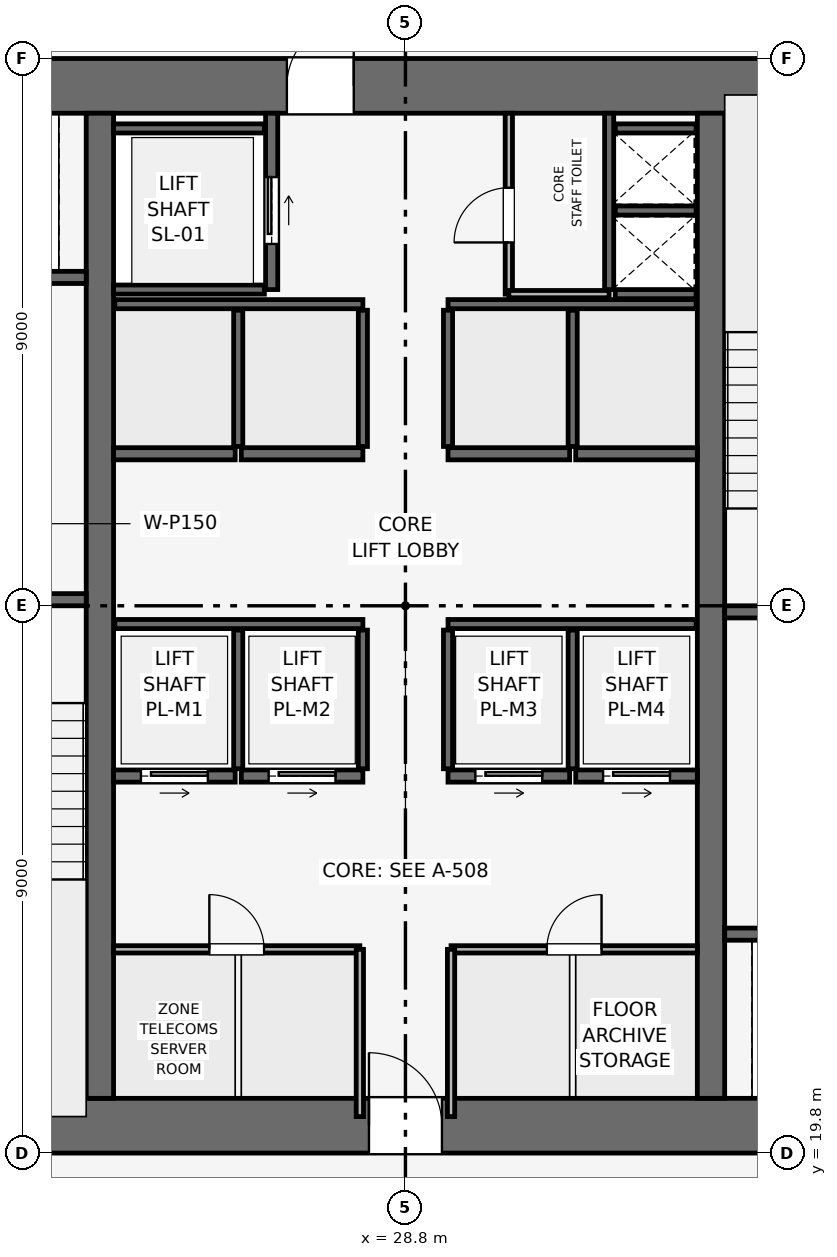
"""IFC4 building model, lengths in metres.
Left out: names, types, materials, properties, quantities, classifications, styles, units other than length and angle.
Written with IfcOpenShell. Run it as: python <this file> out.ifc"""

import sys

from ifc_helpers import new_model, si_unit, direction, frame, frame_2d, origin, place, context, subcontext, project, spatial, rectangle, extrude, element, fill, save


model = new_model("IFC4")
c1 = context("Model", 3, precision=1e-05, world=origin(), true_north=direction((0.0, 1.0)))
c2 = subcontext(c1, "Body", "Model", "MODEL_VIEW")
j1 = project(units=[si_unit("LENGTHUNIT", "METRE"), si_unit("PLANEANGLEUNIT", "RADIAN")], contexts=[c1])
p1 = place(None, origin())
s1 = spatial("IfcSite", under=j1, at=p1, CompositionType="ELEMENT")
p2 = place(p1, origin())
s2 = spatial("IfcBuilding", under=s1, at=p2, CompositionType="ELEMENT")
p3 = place(p2, frame((0.0, 0.0, 172.05)))
s3 = spatial("IfcBuildingStorey", under=s2, at=p3, CompositionType="ELEMENT", Elevation=172.05)
p4 = place(p3, frame((19.8, 20.25, 0.0), z_axis=(0.0, 0.0, 1.0), x_axis=(1.0, 0.0, 0.0)))
e1 = element("IfcWall", 1, at=p4, inside=s3, PredefinedType="SHEAR", context=c2, shape_type="SweptSolid", body=[
    extrude(rectangle(XDim=18.0, YDim=0.9, at=frame_2d((9.0, 0.0))), origin(), (0.0, 0.0, 1.0), 3.75),
])
p5 = place(p4, frame((8.4, 0.0, 0.0)))
e2 = element("IfcOpeningElement", 2, at=p5, cuts=e1, PredefinedType="OPENING", context=c2, shape_type="SweptSolid", body=[
    extrude(rectangle(XDim=1.2, YDim=2.2, at=frame_2d((0.6, 1.1))), frame((0.0, 0.46, 0.0), z_axis=(0.0, -1.0, 0.0), x_axis=(1.0, 0.0, 0.0)), (0.0, 0.0, 1.0), 0.92),
])
p6 = place(p3, frame((19.8, 37.35, 0.0), z_axis=(0.0, 0.0, 1.0), x_axis=(1.0, 0.0, 0.0)))
e3 = element("IfcWall", 3, at=p6, inside=s3, PredefinedType="SHEAR", context=c2, shape_type="SweptSolid", body=[
    extrude(rectangle(XDim=18.0, YDim=0.9, at=frame_2d((9.0, 0.0))), origin(), (0.0, 0.0, 1.0), 3.75),
])
p7 = place(p6, frame((7.05, 0.0, 0.0)))
e4 = element("IfcOpeningElement", 4, at=p7, cuts=e3, PredefinedType="OPENING", context=c2, shape_type="SweptSolid", body=[
    extrude(rectangle(XDim=1.1, YDim=2.15, at=frame_2d((0.55, 1.075))), frame((0.0, 0.46, 0.0), z_axis=(0.0, -1.0, 0.0), x_axis=(1.0, 0.0, 0.0)), (0.0, 0.0, 1.0), 0.92),
])
for number, where, z_axis, x_axis in (
    (5, (23.775, 20.7, 0.0), (0.0, 0.0, 1.0), (0.0, 1.0, 0.0)),
    (6, (33.825, 20.7, 0.0), (0.0, 0.0, 1.0), (0.0, 1.0, 0.0)),
):
    element("IfcWall", number, at=place(p3, frame(where, z_axis=z_axis, x_axis=x_axis)), inside=s3, PredefinedType="SHEAR", context=c2, shape_type="SweptSolid", body=[
        extrude(rectangle(XDim=16.2, YDim=0.45, at=frame_2d((8.1, 0.0))), origin(), (0.0, 0.0, 1.0), 3.75),
    ])
p8 = place(p3, frame((20.4, 28.9, 0.0), z_axis=(0.0, 0.0, 1.0), x_axis=(1.0, 0.0, 0.0)))
e7 = element("IfcWall", 7, at=p8, inside=s3, PredefinedType="SHEAR", context=c2, shape_type="SweptSolid", body=[
    extrude(rectangle(XDim=3.15, YDim=0.2, at=frame_2d((1.575, 0.0))), origin(), (0.0, 0.0, 1.0), 3.495),
])
p9 = place(p8, frame((0.8, 0.0, 0.0)))
e8 = element("IfcOpeningElement", 8, at=p9, cuts=e7, PredefinedType="OPENING", context=c2, shape_type="SweptSolid", body=[
    extrude(rectangle(XDim=1.0, YDim=2.1, at=frame_2d((0.5, 1.05))), frame((0.0, 0.11, 0.0), z_axis=(0.0, -1.0, 0.0), x_axis=(1.0, 0.0, 0.0)), (0.0, 0.0, 1.0), 0.22),
])
p10 = place(p3, frame((34.05, 28.7, 0.0), z_axis=(0.0, 0.0, 1.0), x_axis=(1.0, 0.0, 0.0)))
e9 = element("IfcWall", 9, at=p10, inside=s3, PredefinedType="SHEAR", context=c2, shape_type="SweptSolid", body=[
    extrude(rectangle(XDim=3.15, YDim=0.2, at=frame_2d((1.575, 0.0))), origin(), (0.0, 0.0, 1.0), 3.495),
])
p11 = place(p10, frame((0.8, 0.0, 0.0)))
e10 = element("IfcOpeningElement", 10, at=p11, cuts=e9, PredefinedType="OPENING", context=c2, shape_type="SweptSolid", body=[
    extrude(rectangle(XDim=1.0, YDim=2.1, at=frame_2d((0.5, 1.05))), frame((0.0, 0.11, 0.0), z_axis=(0.0, -1.0, 0.0), x_axis=(1.0, 0.0, 0.0)), (0.0, 0.0, 1.0), 0.22),
])
p12 = place(p3, frame((32.15, 34.0, 0.0), z_axis=(0.0, 0.0, 1.0), x_axis=(0.0, 1.0, 0.0)))
e11 = element("IfcWall", 11, at=p12, inside=s3, PredefinedType="SHEAR", context=c2, shape_type="SweptSolid", body=[
    extrude(rectangle(XDim=2.9, YDim=0.15, at=frame_2d((1.45, 0.0))), origin(), (0.0, 0.0, 1.0), 3.495),
])
for number, where, z_axis, x_axis in (
    (12, (32.25, 33.925, 0.0), (0.0, 0.0, 1.0), (1.0, 0.0, 0.0)),
    (13, (32.25, 35.3, 0.0), (0.0, 0.0, 1.0), (1.0, 0.0, 0.0)),
):
    element("IfcWall", number, at=place(p3, frame(where, z_axis=z_axis, x_axis=x_axis)), inside=s3, PredefinedType="SHEAR", context=c2, shape_type="SweptSolid", body=[
        extrude(rectangle(XDim=1.33, YDim=0.15, at=frame_2d((0.665, 0.0))), origin(), (0.0, 0.0, 1.0), 3.495),
    ])
p13 = place(p3, frame((20.5, 34.2, 0.0), z_axis=(0.0, 0.0, 1.0), x_axis=(1.0, 0.0, 0.0)))
e14 = element("IfcWall", 14, at=p13, inside=s3, PredefinedType="SHEAR", context=c2, shape_type="SweptSolid", body=[
    extrude(rectangle(XDim=3.05, YDim=0.2, at=frame_2d((1.525, 0.0))), origin(), (0.0, 0.0, 1.0), 3.495),
])
p14 = place(p13, frame((0.75, 0.0, 0.0)))
e15 = element("IfcOpeningElement", 15, at=p14, cuts=e14, PredefinedType="OPENING", context=c2, shape_type="SweptSolid", body=[
    extrude(rectangle(XDim=1.1, YDim=2.15, at=frame_2d((0.55, 1.075))), frame((0.0, 0.11, 0.0), z_axis=(0.0, -1.0, 0.0), x_axis=(1.0, 0.0, 0.0)), (0.0, 0.0, 1.0), 0.22),
])
p15 = place(p3, frame((34.05, 23.4, 0.0), z_axis=(0.0, 0.0, 1.0), x_axis=(1.0, 0.0, 0.0)))
e16 = element("IfcWall", 16, at=p15, inside=s3, PredefinedType="SHEAR", context=c2, shape_type="SweptSolid", body=[
    extrude(rectangle(XDim=3.05, YDim=0.2, at=frame_2d((1.525, 0.0))), origin(), (0.0, 0.0, 1.0), 3.495),
])
p16 = place(p15, frame((1.2, 0.0, 0.0)))
e17 = element("IfcOpeningElement", 17, at=p16, cuts=e16, PredefinedType="OPENING", context=c2, shape_type="SweptSolid", body=[
    extrude(rectangle(XDim=1.1, YDim=2.15, at=frame_2d((0.55, 1.075))), frame((0.0, 0.11, 0.0), z_axis=(0.0, -1.0, 0.0), x_axis=(1.0, 0.0, 0.0)), (0.0, 0.0, 1.0), 0.22),
])
p17 = place(p3, frame((26.6, 34.0, 0.0), z_axis=(0.0, 0.0, 1.0), x_axis=(0.0, 1.0, 0.0)))
e18 = element("IfcWall", 18, at=p17, inside=s3, PredefinedType="SHEAR", context=c2, shape_type="SweptSolid", body=[
    extrude(rectangle(XDim=2.9, YDim=0.2, at=frame_2d((1.45, 0.0))), origin(), (0.0, 0.0, 1.0), 3.495),
])
p18 = place(p17, frame((0.75, 0.0, 0.0)))
e19 = element("IfcOpeningElement", 19, at=p18, cuts=e18, PredefinedType="OPENING", context=c2, shape_type="SweptSolid", body=[
    extrude(rectangle(XDim=1.1, YDim=2.15, at=frame_2d((0.55, 1.075))), frame((0.0, 0.11, 0.0), z_axis=(0.0, -1.0, 0.0), x_axis=(1.0, 0.0, 0.0)), (0.0, 0.0, 1.0), 0.22),
])
for number, where, z_axis, x_axis in (
    (20, (24.0, 34.0, 0.0), (0.0, 0.0, 1.0), (1.0, 0.0, 0.0)),
    (21, (24.0, 36.65, 0.0), (0.0, 0.0, 1.0), (1.0, 0.0, 0.0)),
):
    element("IfcWall", number, at=place(p3, frame(where, z_axis=z_axis, x_axis=x_axis)), inside=s3, PredefinedType="SHEAR", context=c2, shape_type="SweptSolid", body=[
        extrude(rectangle(XDim=2.48, YDim=0.15, at=frame_2d((1.24, 0.0))), origin(), (0.0, 0.0, 1.0), 3.495),
    ])
p19 = place(p3, frame((24.0, 26.0, 0.0), z_axis=(0.0, 0.0, 1.0), x_axis=(1.0, 0.0, 0.0)))
e22 = element("IfcWall", 22, at=p19, inside=s3, PredefinedType="SHEAR", context=c2, shape_type="SweptSolid", body=[
    extrude(rectangle(XDim=2.0, YDim=0.2, at=frame_2d((1.0, 0.0))), origin(), (0.0, 0.0, 1.0), 3.495),
])
p20 = place(p19, frame((0.45, 0.0, 0.0)))
e23 = element("IfcOpeningElement", 23, at=p20, cuts=e22, PredefinedType="OPENING", context=c2, shape_type="SweptSolid", body=[
    extrude(rectangle(XDim=1.1, YDim=2.15, at=frame_2d((0.55, 1.075))), frame((0.0, 0.11, 0.0), z_axis=(0.0, -1.0, 0.0), x_axis=(1.0, 0.0, 0.0)), (0.0, 0.0, 1.0), 0.22),
])
p21 = place(p3, frame((26.1, 26.0, 0.0), z_axis=(0.0, 0.0, 1.0), x_axis=(1.0, 0.0, 0.0)))
e24 = element("IfcWall", 24, at=p21, inside=s3, PredefinedType="SHEAR", context=c2, shape_type="SweptSolid", body=[
    extrude(rectangle(XDim=2.0, YDim=0.2, at=frame_2d((1.0, 0.0))), origin(), (0.0, 0.0, 1.0), 3.495),
])
p22 = place(p21, frame((0.45, 0.0, 0.0)))
e25 = element("IfcOpeningElement", 25, at=p22, cuts=e24, PredefinedType="OPENING", context=c2, shape_type="SweptSolid", body=[
    extrude(rectangle(XDim=1.1, YDim=2.15, at=frame_2d((0.55, 1.075))), frame((0.0, 0.11, 0.0), z_axis=(0.0, -1.0, 0.0), x_axis=(1.0, 0.0, 0.0)), (0.0, 0.0, 1.0), 0.22),
])
p23 = place(p3, frame((29.5, 26.0, 0.0), z_axis=(0.0, 0.0, 1.0), x_axis=(1.0, 0.0, 0.0)))
e26 = element("IfcWall", 26, at=p23, inside=s3, PredefinedType="SHEAR", context=c2, shape_type="SweptSolid", body=[
    extrude(rectangle(XDim=2.0, YDim=0.2, at=frame_2d((1.0, 0.0))), origin(), (0.0, 0.0, 1.0), 3.495),
])
p24 = place(p23, frame((0.45, 0.0, 0.0)))
e27 = element("IfcOpeningElement", 27, at=p24, cuts=e26, PredefinedType="OPENING", context=c2, shape_type="SweptSolid", body=[
    extrude(rectangle(XDim=1.1, YDim=2.15, at=frame_2d((0.55, 1.075))), frame((0.0, 0.11, 0.0), z_axis=(0.0, -1.0, 0.0), x_axis=(1.0, 0.0, 0.0)), (0.0, 0.0, 1.0), 0.22),
])
p25 = place(p3, frame((31.6, 26.0, 0.0), z_axis=(0.0, 0.0, 1.0), x_axis=(1.0, 0.0, 0.0)))
e28 = element("IfcWall", 28, at=p25, inside=s3, PredefinedType="SHEAR", context=c2, shape_type="SweptSolid", body=[
    extrude(rectangle(XDim=2.0, YDim=0.2, at=frame_2d((1.0, 0.0))), origin(), (0.0, 0.0, 1.0), 3.495),
])
p26 = place(p25, frame((0.45, 0.0, 0.0)))
e29 = element("IfcOpeningElement", 29, at=p26, cuts=e28, PredefinedType="OPENING", context=c2, shape_type="SweptSolid", body=[
    extrude(rectangle(XDim=1.1, YDim=2.15, at=frame_2d((0.55, 1.075))), frame((0.0, 0.11, 0.0), z_axis=(0.0, -1.0, 0.0), x_axis=(1.0, 0.0, 0.0)), (0.0, 0.0, 1.0), 0.22),
])
for number, where, z_axis, x_axis in (
    (30, (24.0, 31.3, 0.0), (0.0, 0.0, 1.0), (1.0, 0.0, 0.0)),
    (31, (26.1, 31.3, 0.0), (0.0, 0.0, 1.0), (1.0, 0.0, 0.0)),
    (32, (29.5, 31.3, 0.0), (0.0, 0.0, 1.0), (1.0, 0.0, 0.0)),
    (33, (31.6, 31.3, 0.0), (0.0, 0.0, 1.0), (1.0, 0.0, 0.0)),
):
    element("IfcWall", number, at=place(p3, frame(where, z_axis=z_axis, x_axis=x_axis)), inside=s3, PredefinedType="SHEAR", context=c2, shape_type="SweptSolid", body=[
        extrude(rectangle(XDim=2.0, YDim=0.2, at=frame_2d((1.0, 0.0))), origin(), (0.0, 0.0, 1.0), 3.495),
    ])
p27 = place(p3, frame((32.25, 36.65, 0.0), z_axis=(0.0, 0.0, 1.0), x_axis=(1.0, 0.0, 0.0)))
e34 = element("IfcWall", 34, at=p27, inside=s3, PredefinedType="SHEAR", context=c2, shape_type="SweptSolid", body=[
    extrude(rectangle(XDim=1.33, YDim=0.15, at=frame_2d((0.665, 0.0))), origin(), (0.0, 0.0, 1.0), 3.495),
])
for number, where, z_axis, x_axis in (
    (35, (24.02, 28.5, 0.0), (0.0, 0.0, 1.0), (1.0, 0.0, 0.0)),
    (36, (29.5, 28.5, 0.0), (0.0, 0.0, 1.0), (1.0, 0.0, 0.0)),
):
    element("IfcWall", number, at=place(p3, frame(where, z_axis=z_axis, x_axis=x_axis)), inside=s3, PredefinedType="SHEAR", context=c2, shape_type="SweptSolid", body=[
        extrude(rectangle(XDim=4.08, YDim=0.15, at=frame_2d((2.04, 0.0))), origin(), (0.0, 0.0, 1.0), 3.495),
    ])
for number, where, z_axis, x_axis in (
    (37, (26.05, 26.12, 0.0), (0.0, 0.0, 1.0), (0.0, 1.0, 0.0)),
    (38, (28.1, 26.12, 0.0), (0.0, 0.0, 1.0), (0.0, 1.0, 0.0)),
    (39, (29.5, 26.12, 0.0), (0.0, 0.0, 1.0), (0.0, 1.0, 0.0)),
    (40, (31.55, 26.12, 0.0), (0.0, 0.0, 1.0), (0.0, 1.0, 0.0)),
):
    element("IfcWall", number, at=place(p3, frame(where, z_axis=z_axis, x_axis=x_axis)), inside=s3, PredefinedType="SHEAR", context=c2, shape_type="SweptSolid", body=[
        extrude(rectangle(XDim=2.28, YDim=0.15, at=frame_2d((1.14, 0.0))), origin(), (0.0, 0.0, 1.0), 3.495),
    ])
for number, where, z_axis, x_axis in (
    (41, (24.02, 33.76, 0.0), (0.0, 0.0, 1.0), (1.0, 0.0, 0.0)),
    (42, (29.5, 33.76, 0.0), (0.0, 0.0, 1.0), (1.0, 0.0, 0.0)),
):
    element("IfcWall", number, at=place(p3, frame(where, z_axis=z_axis, x_axis=x_axis)), inside=s3, PredefinedType="SHEAR", context=c2, shape_type="SweptSolid", body=[
        extrude(rectangle(XDim=4.08, YDim=0.15, at=frame_2d((2.04, 0.0))), origin(), (0.0, 0.0, 1.0), 3.495),
    ])
for number, where, z_axis, x_axis in (
    (43, (26.05, 31.42, 0.0), (0.0, 0.0, 1.0), (0.0, 1.0, 0.0)),
    (44, (28.1, 31.42, 0.0), (0.0, 0.0, 1.0), (0.0, 1.0, 0.0)),
    (45, (29.5, 31.42, 0.0), (0.0, 0.0, 1.0), (0.0, 1.0, 0.0)),
    (46, (31.55, 31.42, 0.0), (0.0, 0.0, 1.0), (0.0, 1.0, 0.0)),
):
    element("IfcWall", number, at=place(p3, frame(where, z_axis=z_axis, x_axis=x_axis)), inside=s3, PredefinedType="SHEAR", context=c2, shape_type="SweptSolid", body=[
        extrude(rectangle(XDim=2.24, YDim=0.15, at=frame_2d((1.12, 0.0))), origin(), (0.0, 0.0, 1.0), 3.495),
    ])
p28 = place(p3, frame((30.5, 33.925, 0.0), z_axis=(0.0, 0.0, 1.0), x_axis=(0.0, 1.0, 0.0)))
e47 = element("IfcWall", 47, at=p28, inside=s3, PredefinedType="PARTITIONING", context=c2, shape_type="SweptSolid", body=[
    extrude(rectangle(XDim=2.975, YDim=0.12, at=frame_2d((1.487, 0.0))), origin(), (0.0, 0.0, 1.0), 3.495),
])
p29 = place(p28, frame((0.85, 0.0, 0.0)))
e48 = element("IfcOpeningElement", 48, at=p29, cuts=e47, PredefinedType="OPENING", context=c2, shape_type="SweptSolid", body=[
    extrude(rectangle(XDim=0.9, YDim=2.1, at=frame_2d((0.45, 1.05))), frame((0.0, 0.07, 0.0), z_axis=(0.0, -1.0, 0.0), x_axis=(1.0, 0.0, 0.0)), (0.0, 0.0, 1.0), 0.14),
])
p30 = place(p3, frame((30.5, 33.925, 0.0), z_axis=(0.0, 0.0, 1.0), x_axis=(1.0, 0.0, 0.0)))
e49 = element("IfcWall", 49, at=p30, inside=s3, PredefinedType="PARTITIONING", context=c2, shape_type="SweptSolid", body=[
    extrude(rectangle(XDim=1.65, YDim=0.12, at=frame_2d((0.825, 0.0))), origin(), (0.0, 0.0, 1.0), 3.495),
])
p31 = place(p3, frame((24.0, 23.15, 0.0), z_axis=(0.0, 0.0, 1.0), x_axis=(1.0, 0.0, 0.0)))
e50 = element("IfcWall", 50, at=p31, inside=s3, PredefinedType="PARTITIONING", context=c2, shape_type="SweptSolid", body=[
    extrude(rectangle(XDim=4.05, YDim=0.12, at=frame_2d((2.025, 0.0))), origin(), (0.0, 0.0, 1.0), 3.495),
])
p32 = place(p31, frame((1.575, 0.0, 0.0)))
e51 = element("IfcOpeningElement", 51, at=p32, cuts=e50, PredefinedType="OPENING", context=c2, shape_type="SweptSolid", body=[
    extrude(rectangle(XDim=0.9, YDim=2.1, at=frame_2d((0.45, 1.05))), frame((0.0, 0.07, 0.0), z_axis=(0.0, -1.0, 0.0), x_axis=(1.0, 0.0, 0.0)), (0.0, 0.0, 1.0), 0.14),
])
p33 = place(p3, frame((28.05, 20.4, 0.0), z_axis=(0.0, 0.0, 1.0), x_axis=(0.0, 1.0, 0.0)))
e52 = element("IfcWall", 52, at=p33, inside=s3, PredefinedType="PARTITIONING", context=c2, shape_type="SweptSolid", body=[
    extrude(rectangle(XDim=2.75, YDim=0.12, at=frame_2d((1.375, 0.0))), origin(), (0.0, 0.0, 1.0), 3.495),
])
p34 = place(p3, frame((29.55, 23.15, 0.0), z_axis=(0.0, 0.0, 1.0), x_axis=(1.0, 0.0, 0.0)))
e53 = element("IfcWall", 53, at=p34, inside=s3, PredefinedType="PARTITIONING", context=c2, shape_type="SweptSolid", body=[
    extrude(rectangle(XDim=4.05, YDim=0.12, at=frame_2d((2.025, 0.0))), origin(), (0.0, 0.0, 1.0), 3.495),
])
p35 = place(p34, frame((1.575, 0.0, 0.0)))
e54 = element("IfcOpeningElement", 54, at=p35, cuts=e53, PredefinedType="OPENING", context=c2, shape_type="SweptSolid", body=[
    extrude(rectangle(XDim=0.9, YDim=2.1, at=frame_2d((0.45, 1.05))), frame((0.0, 0.07, 0.0), z_axis=(0.0, -1.0, 0.0), x_axis=(1.0, 0.0, 0.0)), (0.0, 0.0, 1.0), 0.14),
])
p36 = place(p3, frame((29.55, 20.4, 0.0), z_axis=(0.0, 0.0, 1.0), x_axis=(0.0, 1.0, 0.0)))
e55 = element("IfcWall", 55, at=p36, inside=s3, PredefinedType="PARTITIONING", context=c2, shape_type="SweptSolid", body=[
    extrude(rectangle(XDim=2.75, YDim=0.12, at=frame_2d((1.375, 0.0))), origin(), (0.0, 0.0, 1.0), 3.495),
])
p37 = place(p18, origin())
e56 = element("IfcDoor", 56, at=p37, inside=s3, OperationType="SLIDING_TO_RIGHT", PredefinedType="DOOR", context=c2, shape_type="SweptSolid", body=[
    extrude(rectangle(XDim=1.1, YDim=2.15, at=frame_2d((0.55, 1.075))), frame((0.0, 0.025, 0.0), z_axis=(0.0, -1.0, 0.0), x_axis=(1.0, 0.0, 0.0)), (0.0, 0.0, 1.0), 0.05),
])
fill(e19, e56)
p38 = place(p20, origin())
e57 = element("IfcDoor", 57, at=p38, inside=s3, OperationType="SLIDING_TO_RIGHT", PredefinedType="DOOR", context=c2, shape_type="SweptSolid", body=[
    extrude(rectangle(XDim=1.1, YDim=2.15, at=frame_2d((0.55, 1.075))), frame((0.0, 0.025, 0.0), z_axis=(0.0, -1.0, 0.0), x_axis=(1.0, 0.0, 0.0)), (0.0, 0.0, 1.0), 0.05),
])
fill(e23, e57)
p39 = place(p22, origin())
e58 = element("IfcDoor", 58, at=p39, inside=s3, OperationType="SLIDING_TO_RIGHT", PredefinedType="DOOR", context=c2, shape_type="SweptSolid", body=[
    extrude(rectangle(XDim=1.1, YDim=2.15, at=frame_2d((0.55, 1.075))), frame((0.0, 0.025, 0.0), z_axis=(0.0, -1.0, 0.0), x_axis=(1.0, 0.0, 0.0)), (0.0, 0.0, 1.0), 0.05),
])
fill(e25, e58)
p40 = place(p24, origin())
e59 = element("IfcDoor", 59, at=p40, inside=s3, OperationType="SLIDING_TO_RIGHT", PredefinedType="DOOR", context=c2, shape_type="SweptSolid", body=[
    extrude(rectangle(XDim=1.1, YDim=2.15, at=frame_2d((0.55, 1.075))), frame((0.0, 0.025, 0.0), z_axis=(0.0, -1.0, 0.0), x_axis=(1.0, 0.0, 0.0)), (0.0, 0.0, 1.0), 0.05),
])
fill(e27, e59)
p41 = place(p26, origin())
e60 = element("IfcDoor", 60, at=p41, inside=s3, OperationType="SLIDING_TO_RIGHT", PredefinedType="DOOR", context=c2, shape_type="SweptSolid", body=[
    extrude(rectangle(XDim=1.1, YDim=2.15, at=frame_2d((0.55, 1.075))), frame((0.0, 0.025, 0.0), z_axis=(0.0, -1.0, 0.0), x_axis=(1.0, 0.0, 0.0)), (0.0, 0.0, 1.0), 0.05),
])
fill(e29, e60)
p42 = place(p29, origin())
e61 = element("IfcDoor", 61, at=p42, inside=s3, OperationType="SINGLE_SWING_LEFT", PredefinedType="DOOR", context=c2, shape_type="SweptSolid", body=[
    extrude(rectangle(XDim=0.9, YDim=2.1, at=frame_2d((0.45, 1.05))), frame((0.0, 0.025, 0.0), z_axis=(0.0, -1.0, 0.0), x_axis=(1.0, 0.0, 0.0)), (0.0, 0.0, 1.0), 0.05),
])
fill(e48, e61)
p43 = place(p32, origin())
e62 = element("IfcDoor", 62, at=p43, inside=s3, OperationType="SINGLE_SWING_LEFT", PredefinedType="DOOR", context=c2, shape_type="SweptSolid", body=[
    extrude(rectangle(XDim=0.9, YDim=2.1, at=frame_2d((0.45, 1.05))), frame((0.0, 0.025, 0.0), z_axis=(0.0, -1.0, 0.0), x_axis=(1.0, 0.0, 0.0)), (0.0, 0.0, 1.0), 0.05),
])
fill(e51, e62)
p44 = place(p35, origin())
e63 = element("IfcDoor", 63, at=p44, inside=s3, OperationType="SINGLE_SWING_RIGHT", PredefinedType="DOOR", context=c2, shape_type="SweptSolid", body=[
    extrude(rectangle(XDim=0.9, YDim=2.1, at=frame_2d((0.45, 1.05))), frame((0.0, 0.025, 0.0), z_axis=(0.0, -1.0, 0.0), x_axis=(1.0, 0.0, 0.0)), (0.0, 0.0, 1.0), 0.05),
])
fill(e54, e63)
p45 = place(p5, origin())
e64 = element("IfcDoor", 64, at=p45, inside=s3, OperationType="SINGLE_SWING_LEFT", PredefinedType="DOOR", context=c2, shape_type="SweptSolid", body=[
    extrude(rectangle(XDim=1.2, YDim=2.2, at=frame_2d((0.6, 1.1))), frame((0.0, 0.025, 0.0), z_axis=(0.0, -1.0, 0.0), x_axis=(1.0, 0.0, 0.0)), (0.0, 0.0, 1.0), 0.05),
])
fill(e2, e64)
p46 = place(p7, origin())
e65 = element("IfcDoor", 65, at=p46, inside=s3, OperationType="SINGLE_SWING_RIGHT", PredefinedType="DOOR", context=c2, shape_type="SweptSolid", body=[
    extrude(rectangle(XDim=1.1, YDim=2.15, at=frame_2d((0.55, 1.075))), frame((0.0, 0.025, 0.0), z_axis=(0.0, -1.0, 0.0), x_axis=(1.0, 0.0, 0.0)), (0.0, 0.0, 1.0), 0.05),
])
fill(e4, e65)
save(model, sys.argv[1])
